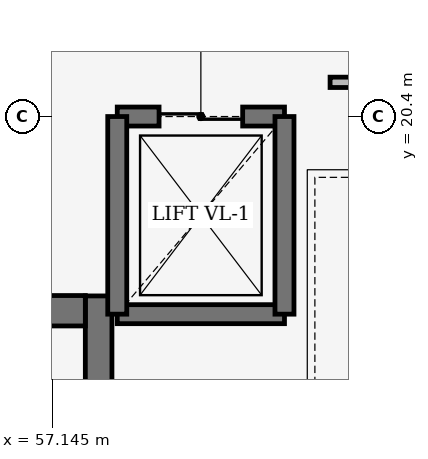
"""IFC4 building model, lengths in metres.
Left out: names, types, materials, properties, quantities, classifications, styles, units other than length and angle.
Written with IfcOpenShell. Run it as: python <this file> out.ifc"""

import sys

from ifc_helpers import new_model, si_unit, direction, frame, frame_2d, origin, place, context, subcontext, project, spatial, rectangle, extrude, element, fill, save


model = new_model("IFC4")
c1 = context("Model", 3, precision=1e-05, world=origin(), true_north=direction((0.0, 1.0)))
c2 = subcontext(c1, "Body", "Model", "MODEL_VIEW")
j1 = project(units=[si_unit("LENGTHUNIT", "METRE"), si_unit("PLANEANGLEUNIT", "RADIAN")], contexts=[c1])
p1 = place(None, origin())
s1 = spatial("IfcSite", under=j1, at=p1, CompositionType="ELEMENT")
p2 = place(p1, origin())
s2 = spatial("IfcBuilding", under=s1, at=p2, CompositionType="ELEMENT")
p3 = place(p2, frame((0.0, 0.0, 4.8)))
s3 = spatial("IfcBuildingStorey", under=s2, at=p3, CompositionType="ELEMENT", Elevation=4.8)
p4 = place(p3, frame((57.755, 13.45, 0.0), z_axis=(0.0, 0.0, 1.0), x_axis=(0.0, 1.0, 0.0)))
e1 = element("IfcWall", 1, at=p4, inside=s3, PredefinedType="SHEAR", context=c2, shape_type="SweptSolid", body=[
    extrude(rectangle(XDim=4.59, YDim=0.35, at=frame_2d((2.295, 0.0))), origin(), (0.0, 0.0, 1.0), 3.95),
])
p5 = place(p3, frame((49.6, 17.845, 0.0), z_axis=(0.0, 0.0, 1.0), x_axis=(1.0, 0.0, 0.0)))
e2 = element("IfcWall", 2, at=p5, inside=s3, PredefinedType="SHEAR", context=c2, shape_type="SweptSolid", body=[
    extrude(rectangle(XDim=7.98, YDim=0.4, at=frame_2d((3.99, 0.0))), origin(), (0.0, 0.0, 1.0), 3.95),
])
p6 = place(p3, frame((58.0, 17.8, 0.0), z_axis=(0.0, 0.0, 1.0), x_axis=(1.0, 0.0, 0.0)))
e3 = element("IfcWall", 3, at=p6, inside=s3, PredefinedType="SHEAR", context=c2, shape_type="SweptSolid", body=[
    extrude(rectangle(XDim=2.2, YDim=0.25, at=frame_2d((1.1, 0.0))), origin(), (0.0, 0.0, 1.0), 3.95),
])
p7 = place(p3, frame((58.0, 20.4, 0.0), z_axis=(0.0, 0.0, 1.0), x_axis=(1.0, 0.0, 0.0)))
e4 = element("IfcWall", 4, at=p7, inside=s3, PredefinedType="SHEAR", context=c2, shape_type="SweptSolid", body=[
    extrude(rectangle(XDim=2.2, YDim=0.25, at=frame_2d((1.1, 0.0))), origin(), (0.0, 0.0, 1.0), 3.95),
])
p8 = place(p7, frame((0.55, 0.0, 0.0)))
e5 = element("IfcOpeningElement", 5, at=p8, cuts=e4, PredefinedType="OPENING", context=c2, shape_type="SweptSolid", body=[
    extrude(rectangle(XDim=1.1, YDim=2.2, at=frame_2d((0.55, 1.1))), frame((0.0, 0.135, 0.0), z_axis=(0.0, -1.0, 0.0), x_axis=(1.0, 0.0, 0.0)), (0.0, 0.0, 1.0), 0.27),
])
for number, where, z_axis, x_axis in (
    (6, (58.0, 17.8, 0.0), (0.0, 0.0, 1.0), (0.0, 1.0, 0.0)),
    (7, (60.2, 17.8, 0.0), (0.0, 0.0, 1.0), (0.0, 1.0, 0.0)),
):
    element("IfcWall", number, at=place(p3, frame(where, z_axis=z_axis, x_axis=x_axis)), inside=s3, PredefinedType="SHEAR", context=c2, shape_type="SweptSolid", body=[
        extrude(rectangle(XDim=2.6, YDim=0.25, at=frame_2d((1.3, 0.0))), origin(), (0.0, 0.0, 1.0), 3.95),
    ])
p9 = place(p3, frame((60.8, 20.85, 0.0), z_axis=(0.0, 0.0, 1.0), x_axis=(1.0, 0.0, 0.0)))
e8 = element("IfcWall", 8, at=p9, inside=s3, PredefinedType="PARTITIONING", context=c2, shape_type="SweptSolid", body=[
    extrude(rectangle(XDim=8.8, YDim=0.136, at=frame_2d((4.4, 0.0))), origin(), (0.0, 0.0, 1.0), 3.93),
])
p10 = place(p9, frame((3.79, 0.0, 0.0)))
e9 = element("IfcOpeningElement", 9, at=p10, cuts=e8, PredefinedType="OPENING", context=c2, shape_type="SweptSolid", body=[
    extrude(rectangle(XDim=1.22, YDim=2.22, at=frame_2d((0.61, 1.11))), frame((0.0, 0.078, 0.0), z_axis=(0.0, -1.0, 0.0), x_axis=(1.0, 0.0, 0.0)), (0.0, 0.0, 1.0), 0.156),
])
p11 = place(p8, origin())
e10 = element("IfcDoor", 10, at=p11, inside=s3, OperationType="DOUBLE_DOOR_SLIDING", PredefinedType="DOOR", context=c2, shape_type="SweptSolid", body=[
    extrude(rectangle(XDim=1.1, YDim=2.2, at=frame_2d((0.55, 1.1))), frame((0.0, 0.025, 0.0), z_axis=(0.0, -1.0, 0.0), x_axis=(1.0, 0.0, 0.0)), (0.0, 0.0, 1.0), 0.05),
])
fill(e5, e10)
save(model, sys.argv[1])
